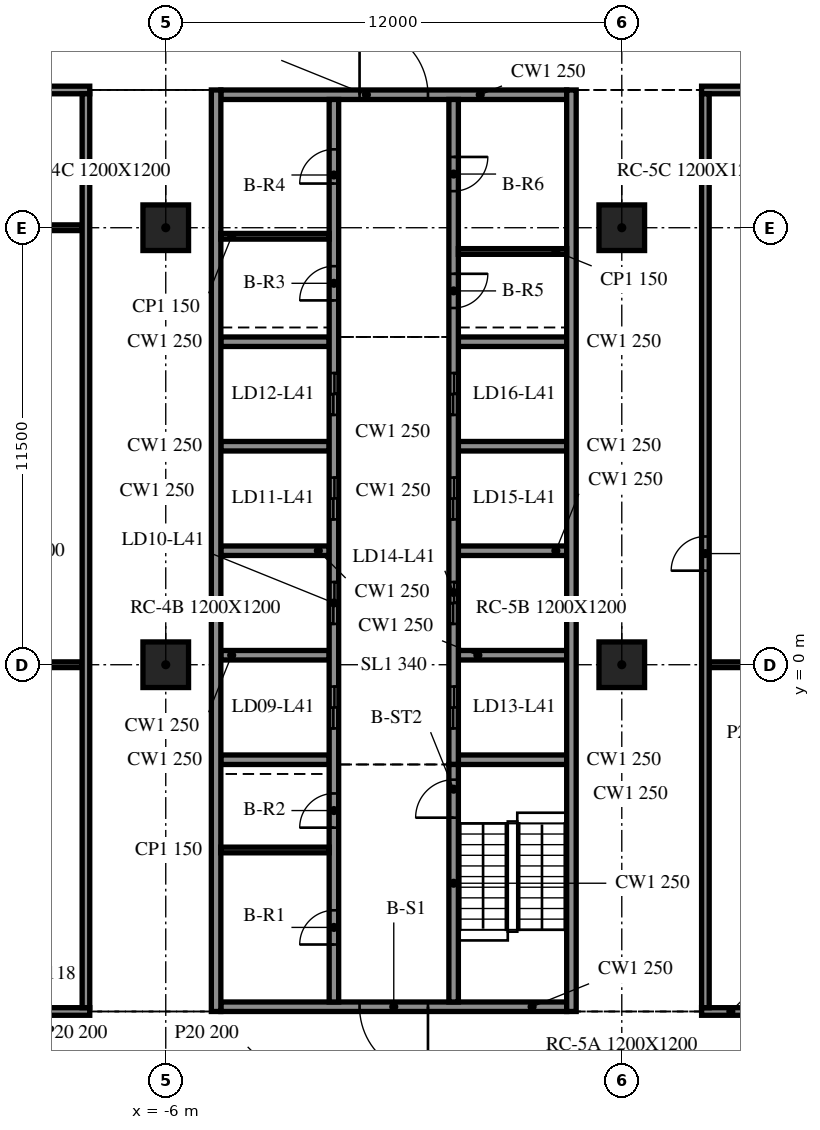
"""IFC4 building model, lengths in metres.
Left out: names, types, materials, properties, quantities, classifications, styles, units other than length and angle.
Written with IfcOpenShell. Run it as: python <this file> out.ifc"""

import sys

from ifc_helpers import new_model, si_unit, direction, frame, frame_2d, origin, origin_2d, place, context, subcontext, project, spatial, rectangle, extrude, element, fill, save


model = new_model("IFC4")
c1 = context("Model", 3, precision=1e-05, world=origin(), true_north=direction((0.0, 1.0)))
c2 = subcontext(c1, "Body", "Model", "MODEL_VIEW")
j1 = project(units=[si_unit("LENGTHUNIT", "METRE"), si_unit("PLANEANGLEUNIT", "RADIAN")], contexts=[c1])
p1 = place(None, origin())
s1 = spatial("IfcSite", under=j1, at=p1, CompositionType="ELEMENT")
p2 = place(p1, origin())
s2 = spatial("IfcBuilding", under=s1, at=p2, CompositionType="ELEMENT")
p3 = place(p2, frame((0.0, 0.0, 174.4)))
s3 = spatial("IfcBuildingStorey", under=s2, at=p3, CompositionType="ELEMENT", Elevation=174.4)
for number, where, z_axis, x_axis in (
    (1, (-6.0, 0.0, -0.34), (0.0, 0.0, 1.0), (1.0, 0.0, 0.0)),
    (2, (-6.0, 11.5, -0.34), (0.0, 0.0, 1.0), (1.0, 0.0, 0.0)),
    (3, (6.0, 0.0, -0.34), (0.0, 0.0, 1.0), (1.0, 0.0, 0.0)),
    (4, (6.0, 11.5, -0.34), (0.0, 0.0, 1.0), (1.0, 0.0, 0.0)),
):
    element("IfcColumn", number, at=place(p3, frame(where, z_axis=z_axis, x_axis=x_axis)), inside=s3, PredefinedType="COLUMN", context=c2, shape_type="SweptSolid", body=[
        extrude(rectangle(XDim=1.2, YDim=1.2, at=origin_2d()), origin(), (0.0, 0.0, 1.0), 3.8),
    ])
for number, where, z_axis, x_axis in (
    (5, (-4.675, 15.125, 0.0), (0.0, 0.0, 1.0), (0.0, -1.0, 0.0)),
    (6, (4.675, -9.125, 0.0), (0.0, 0.0, 1.0), (0.0, 1.0, 0.0)),
):
    element("IfcWall", number, at=place(p3, frame(where, z_axis=z_axis, x_axis=x_axis)), inside=s3, PredefinedType="SOLIDWALL", context=c2, shape_type="SweptSolid", body=[
        extrude(rectangle(XDim=24.25, YDim=0.25, at=frame_2d((12.125, 0.0))), origin(), (0.0, 0.0, 1.0), 3.46),
    ])
p4 = place(p3, frame((4.55, -9.0, 0.0), z_axis=(0.0, 0.0, 1.0), x_axis=(-1.0, 0.0, 0.0)))
e7 = element("IfcWall", 7, at=p4, inside=s3, PredefinedType="SOLIDWALL", context=c2, shape_type="SweptSolid", body=[
    extrude(rectangle(XDim=9.1, YDim=0.25, at=frame_2d((4.55, 0.0))), origin(), (0.0, 0.0, 1.0), 3.46),
])
p5 = place(p4, frame((3.65, 0.0, 0.0)))
e8 = element("IfcOpeningElement", 8, at=p5, cuts=e7, PredefinedType="OPENING", context=c2, shape_type="SweptSolid", body=[
    extrude(rectangle(XDim=1.8, YDim=2.1, at=frame_2d((0.9, 1.05))), frame((0.0, 0.135, 0.0), z_axis=(0.0, -1.0, 0.0), x_axis=(1.0, 0.0, 0.0)), (0.0, 0.0, 1.0), 0.27),
])
p6 = place(p3, frame((-4.55, 15.0, 0.0), z_axis=(0.0, 0.0, 1.0), x_axis=(1.0, 0.0, 0.0)))
e9 = element("IfcWall", 9, at=p6, inside=s3, PredefinedType="SOLIDWALL", context=c2, shape_type="SweptSolid", body=[
    extrude(rectangle(XDim=9.1, YDim=0.25, at=frame_2d((4.55, 0.0))), origin(), (0.0, 0.0, 1.0), 3.46),
])
p7 = place(p6, frame((3.65, 0.0, 0.0)))
e10 = element("IfcOpeningElement", 10, at=p7, cuts=e9, PredefinedType="OPENING", context=c2, shape_type="SweptSolid", body=[
    extrude(rectangle(XDim=1.8, YDim=2.1, at=frame_2d((0.9, 1.05))), frame((0.0, 0.135, 0.0), z_axis=(0.0, -1.0, 0.0), x_axis=(1.0, 0.0, 0.0)), (0.0, 0.0, 1.0), 0.27),
])
p8 = place(p3, frame((-1.575, -8.875, 0.0), z_axis=(0.0, 0.0, 1.0), x_axis=(0.0, 1.0, 0.0)))
e11 = element("IfcWall", 11, at=p8, inside=s3, PredefinedType="SOLIDWALL", context=c2, shape_type="SweptSolid", body=[
    extrude(rectangle(XDim=23.75, YDim=0.25, at=frame_2d((11.875, 0.0))), origin(), (0.0, 0.0, 1.0), 3.46),
])
p9 = place(p8, frame((7.2, 0.0, 0.0)))
e12 = element("IfcOpeningElement", 12, at=p9, cuts=e11, PredefinedType="OPENING", context=c2, shape_type="SweptSolid", body=[
    extrude(rectangle(XDim=1.1, YDim=2.1, at=frame_2d((0.55, 1.05))), frame((0.0, 0.135, 0.0), z_axis=(0.0, -1.0, 0.0), x_axis=(1.0, 0.0, 0.0)), (0.0, 0.0, 1.0), 0.27),
])
p10 = place(p8, frame((9.95, 0.0, 0.0)))
e13 = element("IfcOpeningElement", 13, at=p10, cuts=e11, PredefinedType="OPENING", context=c2, shape_type="SweptSolid", body=[
    extrude(rectangle(XDim=1.1, YDim=2.1, at=frame_2d((0.55, 1.05))), frame((0.0, 0.135, 0.0), z_axis=(0.0, -1.0, 0.0), x_axis=(1.0, 0.0, 0.0)), (0.0, 0.0, 1.0), 0.27),
])
p11 = place(p8, frame((12.7, 0.0, 0.0)))
e14 = element("IfcOpeningElement", 14, at=p11, cuts=e11, PredefinedType="OPENING", context=c2, shape_type="SweptSolid", body=[
    extrude(rectangle(XDim=1.1, YDim=2.1, at=frame_2d((0.55, 1.05))), frame((0.0, 0.135, 0.0), z_axis=(0.0, -1.0, 0.0), x_axis=(1.0, 0.0, 0.0)), (0.0, 0.0, 1.0), 0.27),
])
p12 = place(p8, frame((15.45, 0.0, 0.0)))
e15 = element("IfcOpeningElement", 15, at=p12, cuts=e11, PredefinedType="OPENING", context=c2, shape_type="SweptSolid", body=[
    extrude(rectangle(XDim=1.1, YDim=2.1, at=frame_2d((0.55, 1.05))), frame((0.0, 0.135, 0.0), z_axis=(0.0, -1.0, 0.0), x_axis=(1.0, 0.0, 0.0)), (0.0, 0.0, 1.0), 0.27),
])
p13 = place(p8, frame((1.512, 0.0, 0.0)))
e16 = element("IfcOpeningElement", 16, at=p13, cuts=e11, PredefinedType="OPENING", context=c2, shape_type="SweptSolid", body=[
    extrude(rectangle(XDim=0.9, YDim=2.1, at=frame_2d((0.45, 1.05))), frame((0.0, 0.135, 0.0), z_axis=(0.0, -1.0, 0.0), x_axis=(1.0, 0.0, 0.0)), (0.0, 0.0, 1.0), 0.27),
])
p14 = place(p8, frame((4.587, 0.0, 0.0)))
e17 = element("IfcOpeningElement", 17, at=p14, cuts=e11, PredefinedType="OPENING", context=c2, shape_type="SweptSolid", body=[
    extrude(rectangle(XDim=0.9, YDim=2.1, at=frame_2d((0.45, 1.05))), frame((0.0, 0.135, 0.0), z_axis=(0.0, -1.0, 0.0), x_axis=(1.0, 0.0, 0.0)), (0.0, 0.0, 1.0), 0.27),
])
p15 = place(p8, frame((18.462, 0.0, 0.0)))
e18 = element("IfcOpeningElement", 18, at=p15, cuts=e11, PredefinedType="OPENING", context=c2, shape_type="SweptSolid", body=[
    extrude(rectangle(XDim=0.9, YDim=2.1, at=frame_2d((0.45, 1.05))), frame((0.0, 0.135, 0.0), z_axis=(0.0, -1.0, 0.0), x_axis=(1.0, 0.0, 0.0)), (0.0, 0.0, 1.0), 0.27),
])
p16 = place(p8, frame((21.538, 0.0, 0.0)))
e19 = element("IfcOpeningElement", 19, at=p16, cuts=e11, PredefinedType="OPENING", context=c2, shape_type="SweptSolid", body=[
    extrude(rectangle(XDim=0.9, YDim=2.1, at=frame_2d((0.45, 1.05))), frame((0.0, 0.135, 0.0), z_axis=(0.0, -1.0, 0.0), x_axis=(1.0, 0.0, 0.0)), (0.0, 0.0, 1.0), 0.27),
])
p17 = place(p3, frame((1.575, -8.875, 0.0), z_axis=(0.0, 0.0, 1.0), x_axis=(0.0, 1.0, 0.0)))
e20 = element("IfcWall", 20, at=p17, inside=s3, PredefinedType="SOLIDWALL", context=c2, shape_type="SweptSolid", body=[
    extrude(rectangle(XDim=6.25, YDim=0.25, at=frame_2d((3.125, 0.0))), origin(), (0.0, 0.0, 1.0), 3.46),
])
p18 = place(p17, frame((4.85, 0.0, 0.0)))
e21 = element("IfcOpeningElement", 21, at=p18, cuts=e20, PredefinedType="OPENING", context=c2, shape_type="SweptSolid", body=[
    extrude(rectangle(XDim=1.0, YDim=2.1, at=frame_2d((0.5, 1.05))), frame((0.0, 0.135, 0.0), z_axis=(0.0, -1.0, 0.0), x_axis=(1.0, 0.0, 0.0)), (0.0, 0.0, 1.0), 0.27),
])
p19 = place(p3, frame((1.575, 14.875, 0.0), z_axis=(0.0, 0.0, 1.0), x_axis=(0.0, -1.0, 0.0)))
e22 = element("IfcWall", 22, at=p19, inside=s3, PredefinedType="SOLIDWALL", context=c2, shape_type="SweptSolid", body=[
    extrude(rectangle(XDim=17.5, YDim=0.25, at=frame_2d((8.75, 0.0))), origin(), (0.0, 0.0, 1.0), 3.46),
])
p20 = place(p19, frame((15.45, 0.0, 0.0)))
e23 = element("IfcOpeningElement", 23, at=p20, cuts=e22, PredefinedType="OPENING", context=c2, shape_type="SweptSolid", body=[
    extrude(rectangle(XDim=1.1, YDim=2.1, at=frame_2d((0.55, 1.05))), frame((0.0, 0.135, 0.0), z_axis=(0.0, -1.0, 0.0), x_axis=(1.0, 0.0, 0.0)), (0.0, 0.0, 1.0), 0.27),
])
p21 = place(p19, frame((12.7, 0.0, 0.0)))
e24 = element("IfcOpeningElement", 24, at=p21, cuts=e22, PredefinedType="OPENING", context=c2, shape_type="SweptSolid", body=[
    extrude(rectangle(XDim=1.1, YDim=2.1, at=frame_2d((0.55, 1.05))), frame((0.0, 0.135, 0.0), z_axis=(0.0, -1.0, 0.0), x_axis=(1.0, 0.0, 0.0)), (0.0, 0.0, 1.0), 0.27),
])
p22 = place(p19, frame((9.95, 0.0, 0.0)))
e25 = element("IfcOpeningElement", 25, at=p22, cuts=e22, PredefinedType="OPENING", context=c2, shape_type="SweptSolid", body=[
    extrude(rectangle(XDim=1.1, YDim=2.1, at=frame_2d((0.55, 1.05))), frame((0.0, 0.135, 0.0), z_axis=(0.0, -1.0, 0.0), x_axis=(1.0, 0.0, 0.0)), (0.0, 0.0, 1.0), 0.27),
])
p23 = place(p19, frame((7.2, 0.0, 0.0)))
e26 = element("IfcOpeningElement", 26, at=p23, cuts=e22, PredefinedType="OPENING", context=c2, shape_type="SweptSolid", body=[
    extrude(rectangle(XDim=1.1, YDim=2.1, at=frame_2d((0.55, 1.05))), frame((0.0, 0.135, 0.0), z_axis=(0.0, -1.0, 0.0), x_axis=(1.0, 0.0, 0.0)), (0.0, 0.0, 1.0), 0.27),
])
p24 = place(p19, frame((4.587, 0.0, 0.0)))
e27 = element("IfcOpeningElement", 27, at=p24, cuts=e22, PredefinedType="OPENING", context=c2, shape_type="SweptSolid", body=[
    extrude(rectangle(XDim=0.9, YDim=2.1, at=frame_2d((0.45, 1.05))), frame((0.0, 0.135, 0.0), z_axis=(0.0, -1.0, 0.0), x_axis=(1.0, 0.0, 0.0)), (0.0, 0.0, 1.0), 0.27),
])
p25 = place(p19, frame((1.512, 0.0, 0.0)))
e28 = element("IfcOpeningElement", 28, at=p25, cuts=e22, PredefinedType="OPENING", context=c2, shape_type="SweptSolid", body=[
    extrude(rectangle(XDim=0.9, YDim=2.1, at=frame_2d((0.45, 1.05))), frame((0.0, 0.135, 0.0), z_axis=(0.0, -1.0, 0.0), x_axis=(1.0, 0.0, 0.0)), (0.0, 0.0, 1.0), 0.27),
])
for number, where, z_axis, x_axis in (
    (29, (-4.55, -2.5, 0.0), (0.0, 0.0, 1.0), (1.0, 0.0, 0.0)),
    (30, (-4.55, 0.25, 0.0), (0.0, 0.0, 1.0), (1.0, 0.0, 0.0)),
    (31, (-4.55, 3.0, 0.0), (0.0, 0.0, 1.0), (1.0, 0.0, 0.0)),
    (32, (-4.55, 5.75, 0.0), (0.0, 0.0, 1.0), (1.0, 0.0, 0.0)),
    (33, (-4.55, 8.5, 0.0), (0.0, 0.0, 1.0), (1.0, 0.0, 0.0)),
    (34, (1.7, -2.5, 0.0), (0.0, 0.0, 1.0), (1.0, 0.0, 0.0)),
    (35, (1.7, 0.25, 0.0), (0.0, 0.0, 1.0), (1.0, 0.0, 0.0)),
    (36, (1.7, 3.0, 0.0), (0.0, 0.0, 1.0), (1.0, 0.0, 0.0)),
    (37, (1.7, 5.75, 0.0), (0.0, 0.0, 1.0), (1.0, 0.0, 0.0)),
    (38, (1.7, 8.5, 0.0), (0.0, 0.0, 1.0), (1.0, 0.0, 0.0)),
):
    element("IfcWall", number, at=place(p3, frame(where, z_axis=z_axis, x_axis=x_axis)), inside=s3, PredefinedType="SOLIDWALL", context=c2, shape_type="SweptSolid", body=[
        extrude(rectangle(XDim=2.85, YDim=0.25, at=frame_2d((1.425, 0.0))), origin(), (0.0, 0.0, 1.0), 3.46),
    ])
for number, where, z_axis, x_axis in (
    (39, (-4.55, -4.875, 0.0), (0.0, 0.0, 1.0), (1.0, 0.0, 0.0)),
    (40, (-4.55, 11.275, 0.0), (0.0, 0.0, 1.0), (1.0, 0.0, 0.0)),
    (41, (1.7, 10.875, 0.0), (0.0, 0.0, 1.0), (1.0, 0.0, 0.0)),
):
    element("IfcWall", number, at=place(p3, frame(where, z_axis=z_axis, x_axis=x_axis)), inside=s3, PredefinedType="PARTITIONING", context=c2, shape_type="SweptSolid", body=[
        extrude(rectangle(XDim=2.85, YDim=0.15, at=frame_2d((1.425, 0.0))), origin(), (0.0, 0.0, 1.0), 3.46),
    ])
p26 = place(p3, frame((-16.1, -9.125, 0.0), z_axis=(0.0, 0.0, 1.0), x_axis=(1.0, 0.0, 0.0)))
e42 = element("IfcWall", 42, at=p26, inside=s3, PredefinedType="PARTITIONING", context=c2, shape_type="SweptSolid", body=[
    extrude(rectangle(XDim=8.1, YDim=0.2, at=frame_2d((4.05, 0.0))), origin(), (0.0, 0.0, 1.0), 3.46),
])
p27 = place(p26, frame((3.5, 0.0, 0.0)))
e43 = element("IfcOpeningElement", 43, at=p27, cuts=e42, PredefinedType="OPENING", context=c2, shape_type="SweptSolid", body=[
    extrude(rectangle(XDim=1.0, YDim=2.1, at=frame_2d((0.5, 1.05))), frame((0.0, 0.11, 0.0), z_axis=(0.0, -1.0, 0.0), x_axis=(1.0, 0.0, 0.0)), (0.0, 0.0, 1.0), 0.22),
])
p28 = place(p3, frame((8.1, -9.125, 0.0), z_axis=(0.0, 0.0, 1.0), x_axis=(1.0, 0.0, 0.0)))
e44 = element("IfcWall", 44, at=p28, inside=s3, PredefinedType="PARTITIONING", context=c2, shape_type="SweptSolid", body=[
    extrude(rectangle(XDim=7.7, YDim=0.2, at=frame_2d((3.85, 0.0))), origin(), (0.0, 0.0, 1.0), 3.46),
])
p29 = place(p28, frame((3.3, 0.0, 0.0)))
e45 = element("IfcOpeningElement", 45, at=p29, cuts=e44, PredefinedType="OPENING", context=c2, shape_type="SweptSolid", body=[
    extrude(rectangle(XDim=1.0, YDim=2.1, at=frame_2d((0.5, 1.05))), frame((0.0, 0.11, 0.0), z_axis=(0.0, -1.0, 0.0), x_axis=(1.0, 0.0, 0.0)), (0.0, 0.0, 1.0), 0.22),
])
p30 = place(p3, frame((-15.9, 0.0, 0.0), z_axis=(0.0, 0.0, 1.0), x_axis=(1.0, 0.0, 0.0)))
e46 = element("IfcWall", 46, at=p30, inside=s3, PredefinedType="PARTITIONING", context=c2, shape_type="SweptSolid", body=[
    extrude(rectangle(XDim=7.7, YDim=0.15, at=frame_2d((3.85, 0.0))), origin(), (0.0, 0.0, 1.0), 3.46),
])
p31 = place(p3, frame((8.3, 0.0, 0.0), z_axis=(0.0, 0.0, 1.0), x_axis=(1.0, 0.0, 0.0)))
e47 = element("IfcWall", 47, at=p31, inside=s3, PredefinedType="PARTITIONING", context=c2, shape_type="SweptSolid", body=[
    extrude(rectangle(XDim=7.3, YDim=0.15, at=frame_2d((3.65, 0.0))), origin(), (0.0, 0.0, 1.0), 3.46),
])
p32 = place(p3, frame((-15.9, 11.5, 0.0), z_axis=(0.0, 0.0, 1.0), x_axis=(1.0, 0.0, 0.0)))
e48 = element("IfcWall", 48, at=p32, inside=s3, PredefinedType="PARTITIONING", context=c2, shape_type="SweptSolid", body=[
    extrude(rectangle(XDim=7.7, YDim=0.15, at=frame_2d((3.85, 0.0))), origin(), (0.0, 0.0, 1.0), 3.46),
])
p33 = place(p3, frame((-16.1, 15.125, 0.0), z_axis=(0.0, 0.0, 1.0), x_axis=(1.0, 0.0, 0.0)))
e49 = element("IfcWall", 49, at=p33, inside=s3, PredefinedType="PARTITIONING", context=c2, shape_type="SweptSolid", body=[
    extrude(rectangle(XDim=8.1, YDim=0.2, at=frame_2d((4.05, 0.0))), origin(), (0.0, 0.0, 1.0), 3.46),
])
p34 = place(p33, frame((3.5, 0.0, 0.0)))
e50 = element("IfcOpeningElement", 50, at=p34, cuts=e49, PredefinedType="OPENING", context=c2, shape_type="SweptSolid", body=[
    extrude(rectangle(XDim=1.0, YDim=2.1, at=frame_2d((0.5, 1.05))), frame((0.0, 0.11, 0.0), z_axis=(0.0, -1.0, 0.0), x_axis=(1.0, 0.0, 0.0)), (0.0, 0.0, 1.0), 0.22),
])
p35 = place(p3, frame((8.1, 15.125, 0.0), z_axis=(0.0, 0.0, 1.0), x_axis=(1.0, 0.0, 0.0)))
e51 = element("IfcWall", 51, at=p35, inside=s3, PredefinedType="PARTITIONING", context=c2, shape_type="SweptSolid", body=[
    extrude(rectangle(XDim=7.7, YDim=0.2, at=frame_2d((3.85, 0.0))), origin(), (0.0, 0.0, 1.0), 3.46),
])
p36 = place(p3, frame((-8.1, -9.025, 0.0), z_axis=(0.0, 0.0, 1.0), x_axis=(0.0, 1.0, 0.0)))
e52 = element("IfcWall", 52, at=p36, inside=s3, PredefinedType="PARTITIONING", context=c2, shape_type="SweptSolid", body=[
    extrude(rectangle(XDim=24.05, YDim=0.2, at=frame_2d((12.025, 0.0))), origin(), (0.0, 0.0, 1.0), 3.46),
])
p37 = place(p3, frame((8.2, -9.025, 0.0), z_axis=(0.0, 0.0, 1.0), x_axis=(0.0, 1.0, 0.0)))
e53 = element("IfcWall", 53, at=p37, inside=s3, PredefinedType="PARTITIONING", context=c2, shape_type="SweptSolid", body=[
    extrude(rectangle(XDim=24.05, YDim=0.2, at=frame_2d((12.025, 0.0))), origin(), (0.0, 0.0, 1.0), 3.46),
])
p38 = place(p37, frame((11.5, 0.0, 0.0)))
e54 = element("IfcOpeningElement", 54, at=p38, cuts=e53, PredefinedType="OPENING", context=c2, shape_type="SweptSolid", body=[
    extrude(rectangle(XDim=0.9, YDim=2.1, at=frame_2d((0.45, 1.05))), frame((0.0, 0.11, 0.0), z_axis=(0.0, -1.0, 0.0), x_axis=(1.0, 0.0, 0.0)), (0.0, 0.0, 1.0), 0.22),
])
p39 = place(p5, origin())
e55 = element("IfcDoor", 55, at=p39, inside=s3, OperationType="DOUBLE_DOOR_SINGLE_SWING", PredefinedType="DOOR", context=c2, shape_type="SweptSolid", body=[
    extrude(rectangle(XDim=1.8, YDim=2.1, at=frame_2d((0.9, 1.05))), frame((0.0, 0.025, 0.0), z_axis=(0.0, -1.0, 0.0), x_axis=(1.0, 0.0, 0.0)), (0.0, 0.0, 1.0), 0.05),
])
fill(e8, e55)
p40 = place(p7, origin())
e56 = element("IfcDoor", 56, at=p40, inside=s3, OperationType="DOUBLE_DOOR_SINGLE_SWING", PredefinedType="DOOR", context=c2, shape_type="SweptSolid", body=[
    extrude(rectangle(XDim=1.8, YDim=2.1, at=frame_2d((0.9, 1.05))), frame((0.0, 0.025, 0.0), z_axis=(0.0, -1.0, 0.0), x_axis=(1.0, 0.0, 0.0)), (0.0, 0.0, 1.0), 0.05),
])
fill(e10, e56)
p41 = place(p20, origin())
e57 = element("IfcDoor", 57, at=p41, inside=s3, OperationType="DOUBLE_DOOR_SLIDING", PredefinedType="DOOR", context=c2, shape_type="SweptSolid", body=[
    extrude(rectangle(XDim=1.1, YDim=2.1, at=frame_2d((0.55, 1.05))), frame((0.0, 0.025, 0.0), z_axis=(0.0, -1.0, 0.0), x_axis=(1.0, 0.0, 0.0)), (0.0, 0.0, 1.0), 0.05),
])
fill(e23, e57)
p42 = place(p21, origin())
e58 = element("IfcDoor", 58, at=p42, inside=s3, OperationType="DOUBLE_DOOR_SLIDING", PredefinedType="DOOR", context=c2, shape_type="SweptSolid", body=[
    extrude(rectangle(XDim=1.1, YDim=2.1, at=frame_2d((0.55, 1.05))), frame((0.0, 0.025, 0.0), z_axis=(0.0, -1.0, 0.0), x_axis=(1.0, 0.0, 0.0)), (0.0, 0.0, 1.0), 0.05),
])
fill(e24, e58)
p43 = place(p22, origin())
e59 = element("IfcDoor", 59, at=p43, inside=s3, OperationType="DOUBLE_DOOR_SLIDING", PredefinedType="DOOR", context=c2, shape_type="SweptSolid", body=[
    extrude(rectangle(XDim=1.1, YDim=2.1, at=frame_2d((0.55, 1.05))), frame((0.0, 0.025, 0.0), z_axis=(0.0, -1.0, 0.0), x_axis=(1.0, 0.0, 0.0)), (0.0, 0.0, 1.0), 0.05),
])
fill(e25, e59)
p44 = place(p23, origin())
e60 = element("IfcDoor", 60, at=p44, inside=s3, OperationType="DOUBLE_DOOR_SLIDING", PredefinedType="DOOR", context=c2, shape_type="SweptSolid", body=[
    extrude(rectangle(XDim=1.1, YDim=2.1, at=frame_2d((0.55, 1.05))), frame((0.0, 0.025, 0.0), z_axis=(0.0, -1.0, 0.0), x_axis=(1.0, 0.0, 0.0)), (0.0, 0.0, 1.0), 0.05),
])
fill(e26, e60)
p45 = place(p9, origin())
e61 = element("IfcDoor", 61, at=p45, inside=s3, OperationType="DOUBLE_DOOR_SLIDING", PredefinedType="DOOR", context=c2, shape_type="SweptSolid", body=[
    extrude(rectangle(XDim=1.1, YDim=2.1, at=frame_2d((0.55, 1.05))), frame((0.0, 0.025, 0.0), z_axis=(0.0, -1.0, 0.0), x_axis=(1.0, 0.0, 0.0)), (0.0, 0.0, 1.0), 0.05),
])
fill(e12, e61)
p46 = place(p10, origin())
e62 = element("IfcDoor", 62, at=p46, inside=s3, OperationType="DOUBLE_DOOR_SLIDING", PredefinedType="DOOR", context=c2, shape_type="SweptSolid", body=[
    extrude(rectangle(XDim=1.1, YDim=2.1, at=frame_2d((0.55, 1.05))), frame((0.0, 0.025, 0.0), z_axis=(0.0, -1.0, 0.0), x_axis=(1.0, 0.0, 0.0)), (0.0, 0.0, 1.0), 0.05),
])
fill(e13, e62)
p47 = place(p11, origin())
e63 = element("IfcDoor", 63, at=p47, inside=s3, OperationType="DOUBLE_DOOR_SLIDING", PredefinedType="DOOR", context=c2, shape_type="SweptSolid", body=[
    extrude(rectangle(XDim=1.1, YDim=2.1, at=frame_2d((0.55, 1.05))), frame((0.0, 0.025, 0.0), z_axis=(0.0, -1.0, 0.0), x_axis=(1.0, 0.0, 0.0)), (0.0, 0.0, 1.0), 0.05),
])
fill(e14, e63)
p48 = place(p12, origin())
e64 = element("IfcDoor", 64, at=p48, inside=s3, OperationType="DOUBLE_DOOR_SLIDING", PredefinedType="DOOR", context=c2, shape_type="SweptSolid", body=[
    extrude(rectangle(XDim=1.1, YDim=2.1, at=frame_2d((0.55, 1.05))), frame((0.0, 0.025, 0.0), z_axis=(0.0, -1.0, 0.0), x_axis=(1.0, 0.0, 0.0)), (0.0, 0.0, 1.0), 0.05),
])
fill(e15, e64)
p49 = place(p13, origin())
e65 = element("IfcDoor", 65, at=p49, inside=s3, OperationType="SINGLE_SWING_LEFT", PredefinedType="DOOR", context=c2, shape_type="SweptSolid", body=[
    extrude(rectangle(XDim=0.9, YDim=2.1, at=frame_2d((0.45, 1.05))), frame((0.0, 0.025, 0.0), z_axis=(0.0, -1.0, 0.0), x_axis=(1.0, 0.0, 0.0)), (0.0, 0.0, 1.0), 0.05),
])
fill(e16, e65)
p50 = place(p14, origin())
e66 = element("IfcDoor", 66, at=p50, inside=s3, OperationType="SINGLE_SWING_RIGHT", PredefinedType="DOOR", context=c2, shape_type="SweptSolid", body=[
    extrude(rectangle(XDim=0.9, YDim=2.1, at=frame_2d((0.45, 1.05))), frame((0.0, 0.025, 0.0), z_axis=(0.0, -1.0, 0.0), x_axis=(1.0, 0.0, 0.0)), (0.0, 0.0, 1.0), 0.05),
])
fill(e17, e66)
p51 = place(p15, origin())
e67 = element("IfcDoor", 67, at=p51, inside=s3, OperationType="SINGLE_SWING_LEFT", PredefinedType="DOOR", context=c2, shape_type="SweptSolid", body=[
    extrude(rectangle(XDim=0.9, YDim=2.1, at=frame_2d((0.45, 1.05))), frame((0.0, 0.025, 0.0), z_axis=(0.0, -1.0, 0.0), x_axis=(1.0, 0.0, 0.0)), (0.0, 0.0, 1.0), 0.05),
])
fill(e18, e67)
p52 = place(p16, origin())
e68 = element("IfcDoor", 68, at=p52, inside=s3, OperationType="SINGLE_SWING_RIGHT", PredefinedType="DOOR", context=c2, shape_type="SweptSolid", body=[
    extrude(rectangle(XDim=0.9, YDim=2.1, at=frame_2d((0.45, 1.05))), frame((0.0, 0.025, 0.0), z_axis=(0.0, -1.0, 0.0), x_axis=(1.0, 0.0, 0.0)), (0.0, 0.0, 1.0), 0.05),
])
fill(e19, e68)
p53 = place(p24, origin())
e69 = element("IfcDoor", 69, at=p53, inside=s3, OperationType="SINGLE_SWING_LEFT", PredefinedType="DOOR", context=c2, shape_type="SweptSolid", body=[
    extrude(rectangle(XDim=0.9, YDim=2.1, at=frame_2d((0.45, 1.05))), frame((0.0, 0.025, 0.0), z_axis=(0.0, -1.0, 0.0), x_axis=(1.0, 0.0, 0.0)), (0.0, 0.0, 1.0), 0.05),
])
fill(e27, e69)
p54 = place(p25, origin())
e70 = element("IfcDoor", 70, at=p54, inside=s3, OperationType="SINGLE_SWING_RIGHT", PredefinedType="DOOR", context=c2, shape_type="SweptSolid", body=[
    extrude(rectangle(XDim=0.9, YDim=2.1, at=frame_2d((0.45, 1.05))), frame((0.0, 0.025, 0.0), z_axis=(0.0, -1.0, 0.0), x_axis=(1.0, 0.0, 0.0)), (0.0, 0.0, 1.0), 0.05),
])
fill(e28, e70)
p55 = place(p18, origin())
e71 = element("IfcDoor", 71, at=p55, inside=s3, OperationType="SINGLE_SWING_LEFT", PredefinedType="DOOR", context=c2, shape_type="SweptSolid", body=[
    extrude(rectangle(XDim=1.0, YDim=2.1, at=frame_2d((0.5, 1.05))), frame((0.0, 0.025, 0.0), z_axis=(0.0, -1.0, 0.0), x_axis=(1.0, 0.0, 0.0)), (0.0, 0.0, 1.0), 0.05),
])
fill(e21, e71)
p56 = place(p38, origin())
e72 = element("IfcDoor", 72, at=p56, inside=s3, OperationType="SINGLE_SWING_RIGHT", PredefinedType="DOOR", context=c2, shape_type="SweptSolid", body=[
    extrude(rectangle(XDim=0.9, YDim=2.1, at=frame_2d((0.45, 1.05))), frame((0.0, 0.025, 0.0), z_axis=(0.0, -1.0, 0.0), x_axis=(1.0, 0.0, 0.0)), (0.0, 0.0, 1.0), 0.05),
])
fill(e54, e72)
save(model, sys.argv[1])
